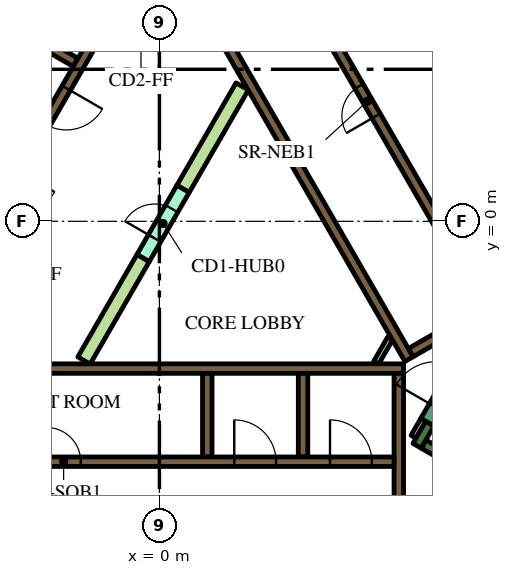
"""IFC4 building model, lengths in metres.
Left out: names, types, materials, properties, quantities, classifications, styles, units other than length and angle.
Written with IfcOpenShell. Run it as: python <this file> out.ifc"""

import sys

from ifc_helpers import new_model, si_unit, direction, frame, frame_2d, origin, place, context, subcontext, project, spatial, polyline, rectangle, outline, extrude, element, fill, save


model = new_model("IFC4")
c1 = context("Model", 3, precision=1e-05, world=origin(), true_north=direction((0.0, 1.0)))
c2 = subcontext(c1, "Body", "Model", "MODEL_VIEW")
j1 = project(units=[si_unit("LENGTHUNIT", "METRE"), si_unit("PLANEANGLEUNIT", "RADIAN")], contexts=[c1])
p1 = place(None, origin())
s1 = spatial("IfcSite", under=j1, at=p1, CompositionType="ELEMENT")
p2 = place(p1, origin())
s2 = spatial("IfcBuilding", under=s1, at=p2, CompositionType="ELEMENT")
p3 = place(p2, frame((0.0, 0.0, 39.3)))
s3 = spatial("IfcBuildingStorey", under=s2, at=p3, CompositionType="ELEMENT", Elevation=39.3)
p4 = place(p3, frame((6.711, 13.476, 0.0), z_axis=(0.0, 0.0, 1.0), x_axis=(0.500002723396, -0.866023831425, 0.0)))
e1 = element("IfcWall", 1, at=p4, inside=s3, PredefinedType="SOLIDWALL", context=c2, shape_type="SweptSolid", body=[
    extrude(rectangle(XDim=20.334, YDim=0.9, at=frame_2d((10.167, 0.0))), origin(), (0.0, 0.0, 1.0), 3.9),
])
p5 = place(p3, frame((12.84, -9.261, 0.0), z_axis=(0.0, 0.0, 1.0), x_axis=(-0.866013990052, 0.500019768644, 0.0)))
e2 = element("IfcWall", 2, at=p5, inside=s3, PredefinedType="SOLIDWALL", context=c2, shape_type="SweptSolid", body=[
    extrude(rectangle(XDim=6.8, YDim=0.25, at=frame_2d((3.4, 0.0))), origin(), (0.0, 0.0, 1.0), 3.9),
])
p6 = place(p3, frame((6.78, -5.906, 0.0), z_axis=(0.0, 0.0, 1.0), x_axis=(0.500223362819, 0.865896406789, 0.0)))
e3 = element("IfcWall", 3, at=p6, inside=s3, PredefinedType="SOLIDWALL", context=c2, shape_type="SweptSolid", body=[
    extrude(rectangle(XDim=0.675, YDim=0.25, at=frame_2d((0.337, 0.0))), origin(), (0.0, 0.0, 1.0), 3.9),
])
p7 = place(p3, frame((-5.545, -3.875, 0.0), z_axis=(0.0, 0.0, 1.0), x_axis=(1.0, 0.0, 0.0)))
e4 = element("IfcWall", 4, at=p7, inside=s3, PredefinedType="SOLIDWALL", context=c2, shape_type="SweptSolid", body=[
    extrude(rectangle(XDim=11.97, YDim=0.25, at=frame_2d((5.985, 0.0))), origin(), (0.0, 0.0, 1.0), 3.9),
])
p8 = place(p3, frame((6.3, -7.268, 0.0), z_axis=(0.0, 0.0, 1.0), x_axis=(0.0, 1.0, 0.0)))
e5 = element("IfcWall", 5, at=p8, inside=s3, PredefinedType="SOLIDWALL", context=c2, shape_type="SweptSolid", body=[
    extrude(rectangle(XDim=3.268, YDim=0.25, at=frame_2d((1.634, 0.0))), origin(), (0.0, 0.0, 1.0), 3.9),
])
for number, where, z_axis, x_axis in (
    (6, (3.78, -4.0, 0.0), (0.0, 0.0, 1.0), (0.0, -1.0, 0.0)),
    (7, (1.26, -4.0, 0.0), (0.0, 0.0, 1.0), (0.0, -1.0, 0.0)),
):
    element("IfcWall", number, at=place(p3, frame(where, z_axis=z_axis, x_axis=x_axis)), inside=s3, PredefinedType="SOLIDWALL", context=c2, shape_type="SweptSolid", body=[
        extrude(rectangle(XDim=2.2, YDim=0.25, at=frame_2d((1.1, 0.0))), origin(), (0.0, 0.0, 1.0), 3.9),
    ])
p9 = place(p3, origin())
e8 = element("IfcWall", 8, at=p9, inside=s3, PredefinedType="SOLIDWALL", context=c2, shape_type="SweptSolid", body=[
    extrude(outline(polyline([(0.566, 6.725), (0.566, 6.875), (0.566, 6.875), (0.565, 6.875), (0.361, 6.875), (0.035, 7.439), (0.252, 7.564), (0.377, 7.348), (6.552, -3.348), (6.677, -3.564), (6.46, -3.689), (0.448, 6.725), (0.565, 6.725), (0.566, 6.725), (0.566, 6.725)])), origin(), (0.0, 0.0, 1.0), 3.9),
])
p10 = place(p3, frame((6.614, -3.456, 0.0), z_axis=(0.0, 0.0, 1.0), x_axis=(0.86602447079, 0.500001615989, 0.0)))
e9 = element("IfcWall", 9, at=p10, inside=s3, PredefinedType="SOLIDWALL", context=c2, shape_type="SweptSolid", body=[
    extrude(rectangle(XDim=3.154, YDim=0.25, at=frame_2d((1.577, 0.0))), origin(), (0.0, 0.0, 1.0), 3.9),
])
p11 = place(p3, frame((-8.06, -1.311, 0.0), z_axis=(0.0, 0.0, 1.0), x_axis=(0.50000273126, 0.866023826885, 0.0)))
e10 = element("IfcWall", 10, at=p11, inside=s3, PredefinedType="SOLIDWALL", context=c2, shape_type="SweptSolid", body=[
    extrude(rectangle(XDim=10.33, YDim=0.25, at=frame_2d((5.165, 0.0))), origin(), (0.0, 0.0, 1.0), 3.9),
])
p12 = place(p3, frame((-2.204, 4.182, 0.0), z_axis=(0.0, 0.0, 1.0), x_axis=(-0.866008176907, 0.50002983664, 0.0)))
e11 = element("IfcWall", 11, at=p12, inside=s3, PredefinedType="SOLIDWALL", context=c2, shape_type="SweptSolid", body=[
    extrude(rectangle(XDim=2.2, YDim=0.25, at=frame_2d((1.1, 0.0))), origin(), (0.0, 0.0, 1.0), 3.9),
])
p13 = place(p3, frame((6.945, -5.222, 0.0), z_axis=(0.0, 0.0, 1.0), x_axis=(-0.499818422106, -0.866130212453, 0.0)))
e12 = element("IfcWall", 12, at=p13, inside=s3, PredefinedType="PARTITIONING", context=c2, shape_type="SweptSolid", body=[
    extrude(rectangle(XDim=0.514, YDim=0.15, at=frame_2d((0.257, 0.0))), origin(), (0.0, 0.0, 1.0), 2.75),
])
p14 = place(p3, frame((5.705, -3.718, 0.0), z_axis=(0.0, 0.0, 1.0), x_axis=(0.499962090823, 0.866047289552, 0.0)))
e13 = element("IfcWall", 13, at=p14, inside=s3, PredefinedType="PARTITIONING", context=c2, shape_type="SweptSolid", body=[
    extrude(rectangle(XDim=0.735, YDim=0.15, at=frame_2d((0.367, 0.0))), origin(), (0.0, 0.0, 1.0), 2.75),
])
e14 = element("IfcWall", 14, at=p9, inside=s3, PredefinedType="PARTITIONING", context=c2, shape_type="SweptSolid", body=[
    extrude(outline(polyline([(-0.59, -0.872), (-0.265, -1.059), (-1.822, -3.756), (-2.147, -3.568), (-0.59, -0.872)])), origin(), (0.0, 0.0, 1.0), 2.75),
])
e15 = element("IfcWall", 15, at=p9, inside=s3, PredefinedType="PARTITIONING", context=c2, shape_type="SweptSolid", body=[
    extrude(outline(polyline([(2.017, 3.643), (2.342, 3.456), (0.785, 0.76), (0.46, 0.947), (2.017, 3.643)])), origin(), (0.0, 0.0, 1.0), 2.75),
])
p15 = place(p3, frame((-6.175, -6.325, 0.0), z_axis=(0.0, 0.0, 1.0), x_axis=(1.0, 0.0, 0.0)))
e16 = element("IfcWall", 16, at=p15, inside=s3, PredefinedType="SOLIDWALL", context=c2, shape_type="SweptSolid", body=[
    extrude(rectangle(XDim=12.35, YDim=0.25, at=frame_2d((6.175, 0.0))), origin(), (0.0, 0.0, 1.0), 3.9),
])
p16 = place(p15, frame((3.205, 0.0, 0.0)))
e17 = element("IfcOpeningElement", 17, at=p16, cuts=e16, PredefinedType="OPENING", context=c2, shape_type="SweptSolid", body=[
    extrude(rectangle(XDim=0.9, YDim=2.1, at=frame_2d((0.45, 1.05))), frame((0.0, 0.135, 0.0), z_axis=(0.0, -1.0, 0.0), x_axis=(1.0, 0.0, 0.0)), (0.0, 0.0, 1.0), 0.27),
])
p17 = place(p15, frame((8.145, 0.0, 0.0)))
e18 = element("IfcOpeningElement", 18, at=p17, cuts=e16, PredefinedType="OPENING", context=c2, shape_type="SweptSolid", body=[
    extrude(rectangle(XDim=1.1, YDim=2.1, at=frame_2d((0.55, 1.05))), frame((0.0, 0.135, 0.0), z_axis=(0.0, -1.0, 0.0), x_axis=(1.0, 0.0, 0.0)), (0.0, 0.0, 1.0), 0.27),
])
p18 = place(p15, frame((10.665, 0.0, 0.0)))
e19 = element("IfcOpeningElement", 19, at=p18, cuts=e16, PredefinedType="OPENING", context=c2, shape_type="SweptSolid", body=[
    extrude(rectangle(XDim=1.1, YDim=2.1, at=frame_2d((0.55, 1.05))), frame((0.0, 0.135, 0.0), z_axis=(0.0, -1.0, 0.0), x_axis=(1.0, 0.0, 0.0)), (0.0, 0.0, 1.0), 0.27),
])
p19 = place(p3, frame((11.553, -0.46, 0.0), z_axis=(0.0, 0.0, 1.0), x_axis=(-0.500006514828, 0.866021642414, 0.0)))
e20 = element("IfcWall", 20, at=p19, inside=s3, PredefinedType="SOLIDWALL", context=c2, shape_type="SweptSolid", body=[
    extrude(rectangle(XDim=12.35, YDim=0.25, at=frame_2d((6.175, 0.0))), origin(), (0.0, 0.0, 1.0), 3.9),
])
p20 = place(p19, frame((0.585, 0.0, 0.0)))
e21 = element("IfcOpeningElement", 21, at=p20, cuts=e20, PredefinedType="OPENING", context=c2, shape_type="SweptSolid", body=[
    extrude(rectangle(XDim=1.1, YDim=2.1, at=frame_2d((0.55, 1.05))), frame((0.0, 0.135, 0.0), z_axis=(0.0, -1.0, 0.0), x_axis=(1.0, 0.0, 0.0)), (0.0, 0.0, 1.0), 0.27),
])
p21 = place(p19, frame((3.105, 0.0, 0.0)))
e22 = element("IfcOpeningElement", 22, at=p21, cuts=e20, PredefinedType="OPENING", context=c2, shape_type="SweptSolid", body=[
    extrude(rectangle(XDim=1.1, YDim=2.1, at=frame_2d((0.55, 1.05))), frame((0.0, 0.135, 0.0), z_axis=(0.0, -1.0, 0.0), x_axis=(1.0, 0.0, 0.0)), (0.0, 0.0, 1.0), 0.27),
])
p22 = place(p19, frame((5.625, 0.0, 0.0)))
e23 = element("IfcOpeningElement", 23, at=p22, cuts=e20, PredefinedType="OPENING", context=c2, shape_type="SweptSolid", body=[
    extrude(rectangle(XDim=1.1, YDim=2.1, at=frame_2d((0.55, 1.05))), frame((0.0, 0.135, 0.0), z_axis=(0.0, -1.0, 0.0), x_axis=(1.0, 0.0, 0.0)), (0.0, 0.0, 1.0), 0.27),
])
p23 = place(p3, frame((8.565, -2.185, 0.0), z_axis=(0.0, 0.0, 1.0), x_axis=(-0.499997954832, 0.866026584559, 0.0)))
e24 = element("IfcWall", 24, at=p23, inside=s3, PredefinedType="SOLIDWALL", context=c2, shape_type="SweptSolid", body=[
    extrude(rectangle(XDim=12.35, YDim=0.25, at=frame_2d((6.175, 0.0))), origin(), (0.0, 0.0, 1.0), 3.9),
])
p24 = place(p23, frame((5.725, 0.0, 0.0)))
e25 = element("IfcOpeningElement", 25, at=p24, cuts=e24, PredefinedType="OPENING", context=c2, shape_type="SweptSolid", body=[
    extrude(rectangle(XDim=0.9, YDim=2.1, at=frame_2d((0.45, 1.05))), frame((0.0, 0.135, 0.0), z_axis=(0.0, -1.0, 0.0), x_axis=(1.0, 0.0, 0.0)), (0.0, 0.0, 1.0), 0.27),
])
p25 = place(p3, frame((-0.898, 6.194, 0.0), z_axis=(0.0, 0.0, 1.0), x_axis=(-0.499996202215, -0.866027596426, 0.0)))
e26 = element("IfcWall", 26, at=p25, inside=s3, PredefinedType="SOLIDWALL", context=c2, shape_type="SweptSolid", body=[
    extrude(rectangle(XDim=9.83, YDim=0.25, at=frame_2d((4.915, 0.0))), origin(), (0.0, 0.0, 1.0), 3.9),
])
p26 = place(p25, frame((0.585, 0.0, 0.0)))
e27 = element("IfcOpeningElement", 27, at=p26, cuts=e26, PredefinedType="OPENING", context=c2, shape_type="SweptSolid", body=[
    extrude(rectangle(XDim=1.1, YDim=2.1, at=frame_2d((0.55, 1.05))), frame((0.0, 0.135, 0.0), z_axis=(0.0, -1.0, 0.0), x_axis=(1.0, 0.0, 0.0)), (0.0, 0.0, 1.0), 0.27),
])
p27 = place(p25, frame((3.105, 0.0, 0.0)))
e28 = element("IfcOpeningElement", 28, at=p27, cuts=e26, PredefinedType="OPENING", context=c2, shape_type="SweptSolid", body=[
    extrude(rectangle(XDim=1.1, YDim=2.1, at=frame_2d((0.55, 1.05))), frame((0.0, 0.135, 0.0), z_axis=(0.0, -1.0, 0.0), x_axis=(1.0, 0.0, 0.0)), (0.0, 0.0, 1.0), 0.27),
])
p28 = place(p25, frame((5.625, 0.0, 0.0)))
e29 = element("IfcOpeningElement", 29, at=p28, cuts=e26, PredefinedType="OPENING", context=c2, shape_type="SweptSolid", body=[
    extrude(rectangle(XDim=1.1, YDim=2.1, at=frame_2d((0.55, 1.05))), frame((0.0, 0.135, 0.0), z_axis=(0.0, -1.0, 0.0), x_axis=(1.0, 0.0, 0.0)), (0.0, 0.0, 1.0), 0.27),
])
p29 = place(p25, frame((8.145, 0.0, 0.0)))
e30 = element("IfcOpeningElement", 30, at=p29, cuts=e26, PredefinedType="OPENING", context=c2, shape_type="SweptSolid", body=[
    extrude(rectangle(XDim=1.1, YDim=2.1, at=frame_2d((0.55, 1.05))), frame((0.0, 0.135, 0.0), z_axis=(0.0, -1.0, 0.0), x_axis=(1.0, 0.0, 0.0)), (0.0, 0.0, 1.0), 0.27),
])
p30 = place(p3, frame((7.053, -5.284, 0.0), z_axis=(0.0, 0.0, 1.0), x_axis=(0.500078061341, 0.865980330357, 0.0)))
e31 = element("IfcWall", 31, at=p30, inside=s3, PredefinedType="SOLIDWALL", context=c2, shape_type="SweptSolid", body=[
    extrude(rectangle(XDim=2.1, YDim=0.4, at=frame_2d((1.05, 0.0))), origin(), (0.0, 0.0, 1.0), 3.9),
])
p31 = place(p30, frame((0.45, 0.0, 0.0)))
e32 = element("IfcOpeningElement", 32, at=p31, cuts=e31, PredefinedType="OPENING", context=c2, shape_type="SweptSolid", body=[
    extrude(rectangle(XDim=1.2, YDim=2.1, at=frame_2d((0.6, 1.05))), frame((0.0, 0.21, 0.0), z_axis=(0.0, -1.0, 0.0), x_axis=(1.0, 0.0, 0.0)), (0.0, 0.0, 1.0), 0.42),
])
p32 = place(p3, frame((-0.427, -0.966, 0.0), z_axis=(0.0, 0.0, 1.0), x_axis=(0.49994051562, 0.866059744384, 0.0)))
e33 = element("IfcWall", 33, at=p32, inside=s3, PredefinedType="PARTITIONING", context=c2, shape_type="SweptSolid", body=[
    extrude(rectangle(XDim=2.1, YDim=0.375, at=frame_2d((1.05, 0.0))), origin(), (0.0, 0.0, 1.0), 2.75),
])
p33 = place(p32, frame((0.6, 0.0, 0.0)))
e34 = element("IfcOpeningElement", 34, at=p33, cuts=e33, PredefinedType="OPENING", context=c2, shape_type="SweptSolid", body=[
    extrude(rectangle(XDim=0.9, YDim=2.1, at=frame_2d((0.45, 1.05))), frame((0.0, 0.198, 0.0), z_axis=(0.0, -1.0, 0.0), x_axis=(1.0, 0.0, 0.0)), (0.0, 0.0, 1.0), 0.395),
])
p34 = place(p3, frame((6.163, 18.475, 0.0), z_axis=(0.0, 0.0, 1.0), x_axis=(0.500001317485, -0.866024643133, 0.0)))
e35 = element("IfcWall", 35, at=p34, inside=s3, PredefinedType="PARTITIONING", context=c2, shape_type="SweptSolid", body=[
    extrude(rectangle(XDim=25.767, YDim=0.15, at=frame_2d((12.883, 0.0))), origin(), (0.0, 0.0, 1.0), 2.75),
])
p35 = place(p34, frame((24.586, 0.0, 0.0)))
e36 = element("IfcOpeningElement", 36, at=p35, cuts=e35, PredefinedType="OPENING", context=c2, shape_type="SweptSolid", body=[
    extrude(rectangle(XDim=1.0, YDim=2.1, at=frame_2d((0.5, 1.05))), frame((0.0, 0.085, 0.0), z_axis=(0.0, -1.0, 0.0), x_axis=(1.0, 0.0, 0.0)), (0.0, 0.0, 1.0), 0.17),
])
p36 = place(p34, frame((16.196, 0.0, 0.0)))
e37 = element("IfcOpeningElement", 37, at=p36, cuts=e35, PredefinedType="OPENING", context=c2, shape_type="SweptSolid", body=[
    extrude(rectangle(XDim=1.0, YDim=2.1, at=frame_2d((0.5, 1.05))), frame((0.0, 0.085, 0.0), z_axis=(0.0, -1.0, 0.0), x_axis=(1.0, 0.0, 0.0)), (0.0, 0.0, 1.0), 0.17),
])
p37 = place(p34, frame((14.789, 0.0, 0.0)))
e38 = element("IfcOpeningElement", 38, at=p37, cuts=e35, PredefinedType="OPENING", context=c2, shape_type="SweptSolid", body=[
    extrude(rectangle(XDim=1.1, YDim=2.1, at=frame_2d((0.55, 1.05))), frame((0.0, 0.085, 0.0), z_axis=(0.0, -1.0, 0.0), x_axis=(1.0, 0.0, 0.0)), (0.0, 0.0, 1.0), 0.17),
])
p38 = place(p34, frame((3.698, 0.0, 0.0)))
e39 = element("IfcOpeningElement", 39, at=p38, cuts=e35, PredefinedType="OPENING", context=c2, shape_type="SweptSolid", body=[
    extrude(rectangle(XDim=1.0, YDim=2.1, at=frame_2d((0.5, 1.05))), frame((0.0, 0.085, 0.0), z_axis=(0.0, -1.0, 0.0), x_axis=(1.0, 0.0, 0.0)), (0.0, 0.0, 1.0), 0.17),
])
p39 = place(p34, frame((2.391, 0.0, 0.0)))
e40 = element("IfcOpeningElement", 40, at=p39, cuts=e35, PredefinedType="OPENING", context=c2, shape_type="SweptSolid", body=[
    extrude(rectangle(XDim=1.0, YDim=2.1, at=frame_2d((0.5, 1.05))), frame((0.0, 0.085, 0.0), z_axis=(0.0, -1.0, 0.0), x_axis=(1.0, 0.0, 0.0)), (0.0, 0.0, 1.0), 0.17),
])
p40 = place(p16, origin())
e41 = element("IfcDoor", 41, at=p40, inside=s3, OperationType="SINGLE_SWING_LEFT", PredefinedType="DOOR", context=c2, shape_type="SweptSolid", body=[
    extrude(rectangle(XDim=0.9, YDim=2.1, at=frame_2d((0.45, 1.05))), frame((0.0, 0.025, 0.0), z_axis=(0.0, -1.0, 0.0), x_axis=(1.0, 0.0, 0.0)), (0.0, 0.0, 1.0), 0.05),
])
fill(e17, e41)
p41 = place(p17, origin())
e42 = element("IfcDoor", 42, at=p41, inside=s3, OperationType="DOUBLE_DOOR_SLIDING", PredefinedType="DOOR", context=c2, shape_type="SweptSolid", body=[
    extrude(rectangle(XDim=1.1, YDim=2.1, at=frame_2d((0.55, 1.05))), frame((0.0, 0.025, 0.0), z_axis=(0.0, -1.0, 0.0), x_axis=(1.0, 0.0, 0.0)), (0.0, 0.0, 1.0), 0.05),
])
fill(e18, e42)
p42 = place(p18, origin())
e43 = element("IfcDoor", 43, at=p42, inside=s3, OperationType="DOUBLE_DOOR_SLIDING", PredefinedType="DOOR", context=c2, shape_type="SweptSolid", body=[
    extrude(rectangle(XDim=1.1, YDim=2.1, at=frame_2d((0.55, 1.05))), frame((0.0, 0.025, 0.0), z_axis=(0.0, -1.0, 0.0), x_axis=(1.0, 0.0, 0.0)), (0.0, 0.0, 1.0), 0.05),
])
fill(e19, e43)
p43 = place(p24, origin())
e44 = element("IfcDoor", 44, at=p43, inside=s3, OperationType="SINGLE_SWING_LEFT", PredefinedType="DOOR", context=c2, shape_type="SweptSolid", body=[
    extrude(rectangle(XDim=0.9, YDim=2.1, at=frame_2d((0.45, 1.05))), frame((0.0, 0.025, 0.0), z_axis=(0.0, -1.0, 0.0), x_axis=(1.0, 0.0, 0.0)), (0.0, 0.0, 1.0), 0.05),
])
fill(e25, e44)
p44 = place(p27, origin())
e45 = element("IfcDoor", 45, at=p44, inside=s3, OperationType="DOUBLE_DOOR_SLIDING", PredefinedType="DOOR", context=c2, shape_type="SweptSolid", body=[
    extrude(rectangle(XDim=1.1, YDim=2.1, at=frame_2d((0.55, 1.05))), frame((0.0, 0.025, 0.0), z_axis=(0.0, -1.0, 0.0), x_axis=(1.0, 0.0, 0.0)), (0.0, 0.0, 1.0), 0.05),
])
fill(e28, e45)
p45 = place(p33, origin())
e46 = element("IfcDoor", 46, at=p45, inside=s3, OperationType="SINGLE_SWING_LEFT", PredefinedType="DOOR", context=c2, shape_type="SweptSolid", body=[
    extrude(rectangle(XDim=0.9, YDim=2.1, at=frame_2d((0.45, 1.05))), frame((0.0, 0.025, 0.0), z_axis=(0.0, -1.0, 0.0), x_axis=(1.0, 0.0, 0.0)), (0.0, 0.0, 1.0), 0.05),
])
fill(e34, e46)
save(model, sys.argv[1])
